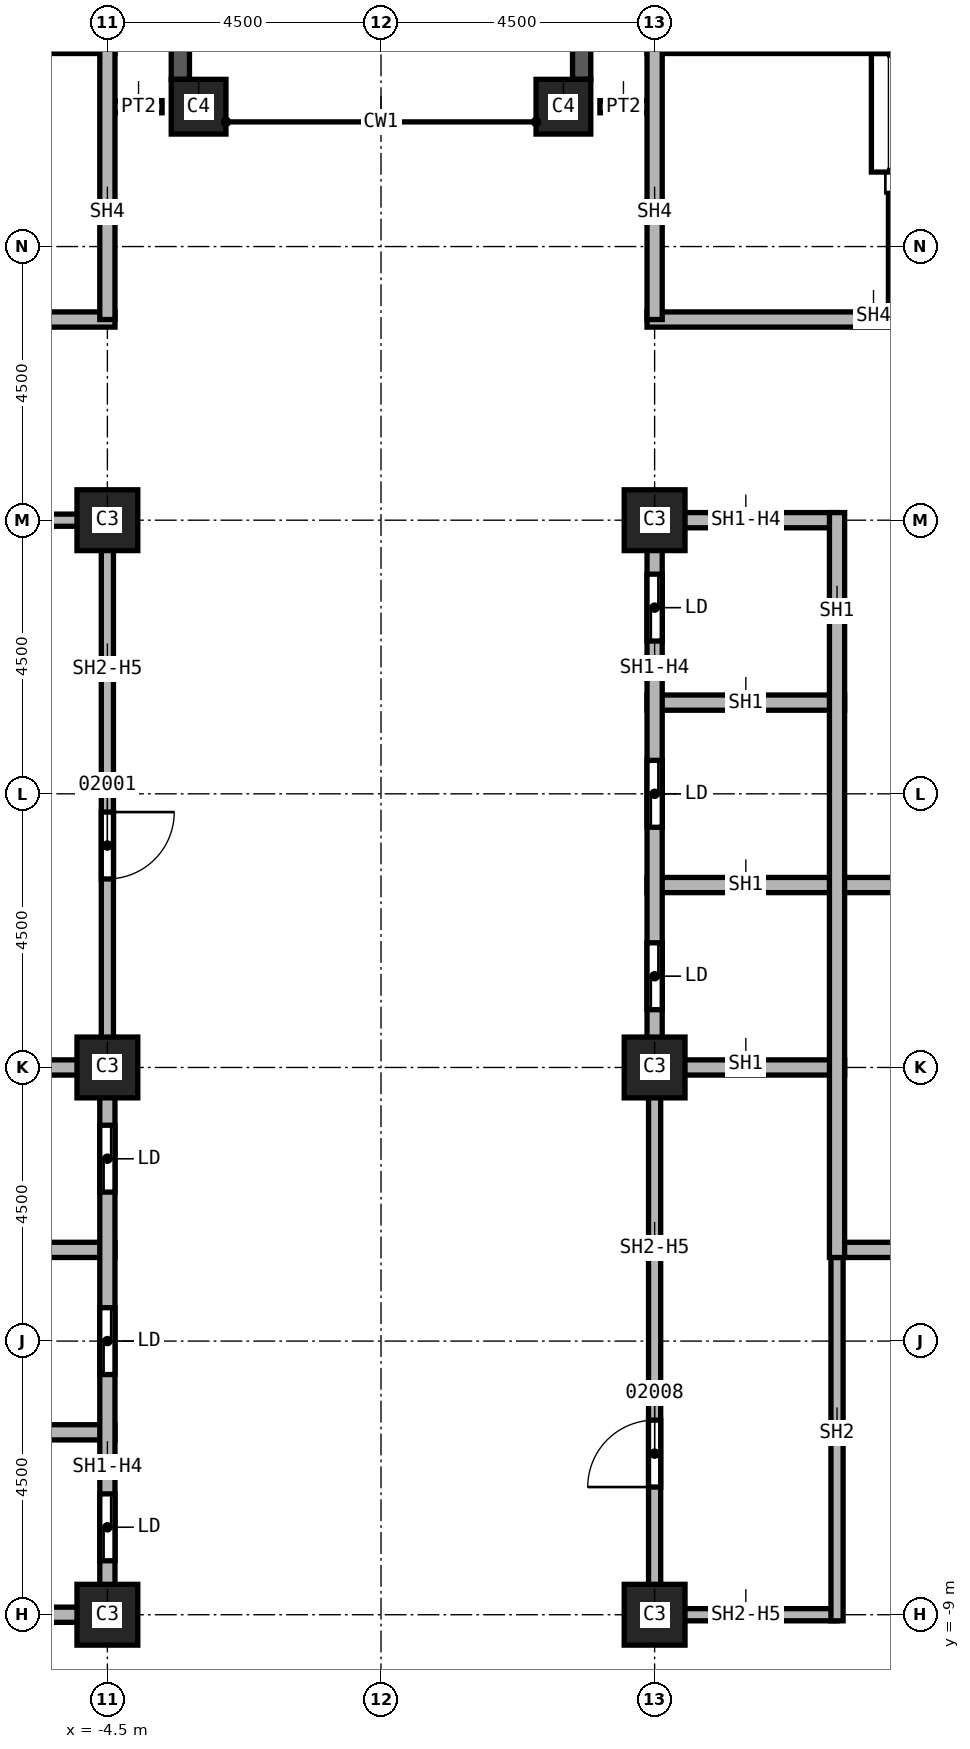
"""IFC4 building model, lengths in metres.
Left out: names, types, materials, properties, quantities, classifications, styles, units other than length and angle.
Written with IfcOpenShell. Run it as: python <this file> out.ifc"""

import sys

from ifc_helpers import new_model, si_unit, direction, frame, frame_2d, origin, origin_2d, place, context, subcontext, project, spatial, rectangle, extrude, element, fill, save


model = new_model("IFC4")
c1 = context("Model", 3, precision=1e-05, world=origin(), true_north=direction((0.0, 1.0)))
c2 = subcontext(c1, "Body", "Model", "MODEL_VIEW")
j1 = project(units=[si_unit("LENGTHUNIT", "METRE"), si_unit("PLANEANGLEUNIT", "RADIAN")], contexts=[c1])
p1 = place(None, origin())
s1 = spatial("IfcSite", under=j1, at=p1, CompositionType="ELEMENT")
p2 = place(p1, origin())
s2 = spatial("IfcBuilding", under=s1, at=p2, CompositionType="ELEMENT")
p3 = place(p2, frame((0.0, 0.0, 80.0)))
s3 = spatial("IfcBuildingStorey", under=s2, at=p3, CompositionType="ELEMENT", Elevation=80.0)
for number, where, z_axis, x_axis in (
    (1, (4.5, 0.0, 0.0), (0.0, 0.0, 1.0), (1.0, 0.0, 0.0)),
    (2, (4.5, 9.0, 0.0), (0.0, 0.0, 1.0), (1.0, 0.0, 0.0)),
    (3, (4.5, -9.0, 0.0), (0.0, 0.0, 1.0), (1.0, 0.0, 0.0)),
    (4, (-4.5, 0.0, 0.0), (0.0, 0.0, 1.0), (1.0, 0.0, 0.0)),
    (5, (-4.5, 9.0, 0.0), (0.0, 0.0, 1.0), (1.0, 0.0, 0.0)),
    (6, (-4.5, -9.0, 0.0), (0.0, 0.0, 1.0), (1.0, 0.0, 0.0)),
):
    element("IfcColumn", number, at=place(p3, frame(where, z_axis=z_axis, x_axis=x_axis)), inside=s3, PredefinedType="COLUMN", context=c2, shape_type="SweptSolid", body=[
        extrude(rectangle(XDim=1.0, YDim=1.0, at=origin_2d()), origin(), (0.0, 0.0, 1.0), 3.7),
    ])
for number, where, z_axis, x_axis in (
    (7, (3.0, 15.8, 0.0), (0.0, 0.0, 1.0), (1.0, 0.0, 0.0)),
    (8, (-3.0, 15.8, 0.0), (0.0, 0.0, 1.0), (1.0, 0.0, 0.0)),
):
    element("IfcColumn", number, at=place(p3, frame(where, z_axis=z_axis, x_axis=x_axis)), inside=s3, PredefinedType="COLUMN", context=c2, shape_type="SweptSolid", body=[
        extrude(rectangle(XDim=0.9, YDim=0.9, at=origin_2d()), origin(), (0.0, 0.0, 1.0), 3.7),
    ])
p4 = place(p3, frame((3.3, 24.2, 0.0), z_axis=(0.0, 0.0, 1.0), x_axis=(0.0, -1.0, 0.0)))
e9 = element("IfcWall", 9, at=p4, inside=s3, PredefinedType="SOLIDWALL", context=c2, shape_type="SweptSolid", body=[
    extrude(rectangle(XDim=7.95, YDim=0.3, at=frame_2d((3.975, 0.0))), origin(), (0.0, 0.0, 1.0), 3.1),
])
p5 = place(p4, frame((0.788, 0.0, 0.8)))
e10 = element("IfcOpeningElement", 10, at=p5, cuts=e9, PredefinedType="OPENING", context=c2, shape_type="SweptSolid", body=[
    extrude(rectangle(XDim=2.4, YDim=1.95, at=frame_2d((1.2, 0.975))), frame((0.0, 0.15, 0.0), z_axis=(0.0, -1.0, 0.0), x_axis=(1.0, 0.0, 0.0)), (0.0, 0.0, 1.0), 0.3),
])
p6 = place(p4, frame((4.762, 0.0, 0.8)))
e11 = element("IfcOpeningElement", 11, at=p6, cuts=e9, PredefinedType="OPENING", context=c2, shape_type="SweptSolid", body=[
    extrude(rectangle(XDim=2.4, YDim=1.95, at=frame_2d((1.2, 0.975))), frame((0.0, 0.15, 0.0), z_axis=(0.0, -1.0, 0.0), x_axis=(1.0, 0.0, 0.0)), (0.0, 0.0, 1.0), 0.3),
])
p7 = place(p3, frame((-3.3, 16.25, 0.0), z_axis=(0.0, 0.0, 1.0), x_axis=(0.0, 1.0, 0.0)))
e12 = element("IfcWall", 12, at=p7, inside=s3, PredefinedType="SOLIDWALL", context=c2, shape_type="SweptSolid", body=[
    extrude(rectangle(XDim=7.95, YDim=0.3, at=frame_2d((3.975, 0.0))), origin(), (0.0, 0.0, 1.0), 3.1),
])
p8 = place(p7, frame((0.788, 0.0, 0.8)))
e13 = element("IfcOpeningElement", 13, at=p8, cuts=e12, PredefinedType="OPENING", context=c2, shape_type="SweptSolid", body=[
    extrude(rectangle(XDim=2.4, YDim=1.95, at=frame_2d((1.2, 0.975))), frame((0.0, 0.15, 0.0), z_axis=(0.0, -1.0, 0.0), x_axis=(1.0, 0.0, 0.0)), (0.0, 0.0, 1.0), 0.3),
])
p9 = place(p7, frame((4.762, 0.0, 0.8)))
e14 = element("IfcOpeningElement", 14, at=p9, cuts=e12, PredefinedType="OPENING", context=c2, shape_type="SweptSolid", body=[
    extrude(rectangle(XDim=2.4, YDim=1.95, at=frame_2d((1.2, 0.975))), frame((0.0, 0.15, 0.0), z_axis=(0.0, -1.0, 0.0), x_axis=(1.0, 0.0, 0.0)), (0.0, 0.0, 1.0), 0.3),
])
for number, where, z_axis, x_axis in (
    (15, (-4.5, 15.8, 0.0), (0.0, 0.0, 1.0), (1.0, 0.0, 0.0)),
    (16, (3.6, 15.8, 0.0), (0.0, 0.0, 1.0), (1.0, 0.0, 0.0)),
):
    element("IfcWall", number, at=place(p3, frame(where, z_axis=z_axis, x_axis=x_axis)), inside=s3, PredefinedType="PARTITIONING", context=c2, shape_type="SweptSolid", body=[
        extrude(rectangle(XDim=0.9, YDim=0.2, at=frame_2d((0.45, 0.0))), origin(), (0.0, 0.0, 1.0), 3.7),
    ])
p10 = place(p3, frame((-7.5, 9.0, 0.0), z_axis=(0.0, 0.0, 1.0), x_axis=(1.0, 0.0, 0.0)))
e17 = element("IfcWall", 17, at=p10, inside=s3, PredefinedType="SOLIDWALL", context=c2, shape_type="SweptSolid", body=[
    extrude(rectangle(XDim=3.0, YDim=0.2, at=frame_2d((1.5, 0.0))), origin(), (0.0, 0.0, 1.0), 2.938),
])
p11 = place(p3, frame((-4.5, 9.1, 0.0), z_axis=(0.0, 0.0, 1.0), x_axis=(0.0, -1.0, 0.0)))
e18 = element("IfcWall", 18, at=p11, inside=s3, PredefinedType="SOLIDWALL", context=c2, shape_type="SweptSolid", body=[
    extrude(rectangle(XDim=9.1, YDim=0.2, at=frame_2d((4.55, 0.0))), origin(), (0.0, 0.0, 1.0), 2.938),
])
p12 = place(p11, frame((4.9, 0.0, 0.0)))
e19 = element("IfcOpeningElement", 19, at=p12, cuts=e18, PredefinedType="OPENING", context=c2, shape_type="SweptSolid", body=[
    extrude(rectangle(XDim=1.1, YDim=2.1, at=frame_2d((0.55, 1.05))), frame((0.0, 0.1, 0.0), z_axis=(0.0, -1.0, 0.0), x_axis=(1.0, 0.0, 0.0)), (0.0, 0.0, 1.0), 0.2),
])
p13 = place(p3, frame((4.5, -9.1, 0.0), z_axis=(0.0, 0.0, 1.0), x_axis=(0.0, 1.0, 0.0)))
e20 = element("IfcWall", 20, at=p13, inside=s3, PredefinedType="SOLIDWALL", context=c2, shape_type="SweptSolid", body=[
    extrude(rectangle(XDim=9.1, YDim=0.2, at=frame_2d((4.55, 0.0))), origin(), (0.0, 0.0, 1.0), 2.938),
])
p14 = place(p13, frame((2.2, 0.0, 0.0)))
e21 = element("IfcOpeningElement", 21, at=p14, cuts=e20, PredefinedType="OPENING", context=c2, shape_type="SweptSolid", body=[
    extrude(rectangle(XDim=1.1, YDim=2.1, at=frame_2d((0.55, 1.05))), frame((0.0, 0.1, 0.0), z_axis=(0.0, -1.0, 0.0), x_axis=(1.0, 0.0, 0.0)), (0.0, 0.0, 1.0), 0.2),
])
p15 = place(p3, frame((7.5, -9.0, 0.0), z_axis=(0.0, 0.0, 1.0), x_axis=(-1.0, 0.0, 0.0)))
e22 = element("IfcWall", 22, at=p15, inside=s3, PredefinedType="SOLIDWALL", context=c2, shape_type="SweptSolid", body=[
    extrude(rectangle(XDim=3.0, YDim=0.2, at=frame_2d((1.5, 0.0))), origin(), (0.0, 0.0, 1.0), 2.938),
])
p16 = place(p3, frame((7.5, -2.875, 0.0), z_axis=(0.0, 0.0, 1.0), x_axis=(0.0, -1.0, 0.0)))
e23 = element("IfcWall", 23, at=p16, inside=s3, PredefinedType="SOLIDWALL", context=c2, shape_type="SweptSolid", body=[
    extrude(rectangle(XDim=6.225, YDim=0.2, at=frame_2d((3.113, 0.0))), origin(), (0.0, 0.0, 1.0), 3.7),
])
p17 = place(p3, frame((-13.625, -3.0, 0.0), z_axis=(0.0, 0.0, 1.0), x_axis=(1.0, 0.0, 0.0)))
e24 = element("IfcWall", 24, at=p17, inside=s3, PredefinedType="SOLIDWALL", context=c2, shape_type="SweptSolid", body=[
    extrude(rectangle(XDim=9.25, YDim=0.25, at=frame_2d((4.625, 0.0))), origin(), (0.0, 0.0, 1.0), 3.7),
])
p18 = place(p17, frame((3.25, 0.0, 0.0)))
e25 = element("IfcOpeningElement", 25, at=p18, cuts=e24, PredefinedType="OPENING", context=c2, shape_type="SweptSolid", body=[
    extrude(rectangle(XDim=1.1, YDim=2.1, at=frame_2d((0.55, 1.05))), frame((0.0, 0.125, 0.0), z_axis=(0.0, -1.0, 0.0), x_axis=(1.0, 0.0, 0.0)), (0.0, 0.0, 1.0), 0.25),
])
for number, where, z_axis, x_axis in (
    (26, (-7.625, -6.0, 0.0), (0.0, 0.0, 1.0), (1.0, 0.0, 0.0)),
    (27, (-7.625, 0.0, 0.0), (0.0, 0.0, 1.0), (1.0, 0.0, 0.0)),
):
    element("IfcWall", number, at=place(p3, frame(where, z_axis=z_axis, x_axis=x_axis)), inside=s3, PredefinedType="SOLIDWALL", context=c2, shape_type="SweptSolid", body=[
        extrude(rectangle(XDim=3.25, YDim=0.25, at=frame_2d((1.625, 0.0))), origin(), (0.0, 0.0, 1.0), 3.7),
    ])
p19 = place(p3, frame((-4.5, -9.0, 0.0), z_axis=(0.0, 0.0, 1.0), x_axis=(-1.0, 0.0, 0.0)))
e28 = element("IfcWall", 28, at=p19, inside=s3, PredefinedType="SOLIDWALL", context=c2, shape_type="SweptSolid", body=[
    extrude(rectangle(XDim=3.0, YDim=0.25, at=frame_2d((1.5, 0.0))), origin(), (0.0, 0.0, 1.0), 2.938),
])
p20 = place(p3, frame((-4.5, 0.0, 0.0), z_axis=(0.0, 0.0, 1.0), x_axis=(0.0, -1.0, 0.0)))
e29 = element("IfcWall", 29, at=p20, inside=s3, PredefinedType="SOLIDWALL", context=c2, shape_type="SweptSolid", body=[
    extrude(rectangle(XDim=9.125, YDim=0.25, at=frame_2d((4.562, 0.0))), origin(), (0.0, 0.0, 1.0), 2.938),
])
p21 = place(p20, frame((7.012, 0.0, 0.0)))
e30 = element("IfcOpeningElement", 30, at=p21, cuts=e29, PredefinedType="OPENING", context=c2, shape_type="SweptSolid", body=[
    extrude(rectangle(XDim=1.1, YDim=2.1, at=frame_2d((0.55, 1.05))), frame((0.0, 0.125, 0.0), z_axis=(0.0, -1.0, 0.0), x_axis=(1.0, 0.0, 0.0)), (0.0, 0.0, 1.0), 0.25),
])
p22 = place(p20, frame((3.95, 0.0, 0.0)))
e31 = element("IfcOpeningElement", 31, at=p22, cuts=e29, PredefinedType="OPENING", context=c2, shape_type="SweptSolid", body=[
    extrude(rectangle(XDim=1.1, YDim=2.1, at=frame_2d((0.55, 1.05))), frame((0.0, 0.125, 0.0), z_axis=(0.0, -1.0, 0.0), x_axis=(1.0, 0.0, 0.0)), (0.0, 0.0, 1.0), 0.25),
])
p23 = place(p20, frame((0.95, 0.0, 0.0)))
e32 = element("IfcOpeningElement", 32, at=p23, cuts=e29, PredefinedType="OPENING", context=c2, shape_type="SweptSolid", body=[
    extrude(rectangle(XDim=1.1, YDim=2.1, at=frame_2d((0.55, 1.05))), frame((0.0, 0.125, 0.0), z_axis=(0.0, -1.0, 0.0), x_axis=(1.0, 0.0, 0.0)), (0.0, 0.0, 1.0), 0.25),
])
p24 = place(p3, frame((4.375, 0.0, 0.0), z_axis=(0.0, 0.0, 1.0), x_axis=(1.0, 0.0, 0.0)))
e33 = element("IfcWall", 33, at=p24, inside=s3, PredefinedType="SOLIDWALL", context=c2, shape_type="SweptSolid", body=[
    extrude(rectangle(XDim=3.25, YDim=0.25, at=frame_2d((1.625, 0.0))), origin(), (0.0, 0.0, 1.0), 3.7),
])
p25 = place(p3, frame((4.375, 3.0, 0.0), z_axis=(0.0, 0.0, 1.0), x_axis=(1.0, 0.0, 0.0)))
e34 = element("IfcWall", 34, at=p25, inside=s3, PredefinedType="SOLIDWALL", context=c2, shape_type="SweptSolid", body=[
    extrude(rectangle(XDim=9.25, YDim=0.25, at=frame_2d((4.625, 0.0))), origin(), (0.0, 0.0, 1.0), 3.7),
])
p26 = place(p25, frame((4.125, 0.0, 0.0)))
e35 = element("IfcOpeningElement", 35, at=p26, cuts=e34, PredefinedType="OPENING", context=c2, shape_type="SweptSolid", body=[
    extrude(rectangle(XDim=1.1, YDim=2.1, at=frame_2d((0.55, 1.05))), frame((0.0, 0.125, 0.0), z_axis=(0.0, -1.0, 0.0), x_axis=(1.0, 0.0, 0.0)), (0.0, 0.0, 1.0), 0.25),
])
p27 = place(p3, frame((4.375, 6.0, 0.0), z_axis=(0.0, 0.0, 1.0), x_axis=(1.0, 0.0, 0.0)))
e36 = element("IfcWall", 36, at=p27, inside=s3, PredefinedType="SOLIDWALL", context=c2, shape_type="SweptSolid", body=[
    extrude(rectangle(XDim=3.25, YDim=0.25, at=frame_2d((1.625, 0.0))), origin(), (0.0, 0.0, 1.0), 3.7),
])
p28 = place(p3, frame((4.5, 0.0, 0.0), z_axis=(0.0, 0.0, 1.0), x_axis=(0.0, 1.0, 0.0)))
e37 = element("IfcWall", 37, at=p28, inside=s3, PredefinedType="SOLIDWALL", context=c2, shape_type="SweptSolid", body=[
    extrude(rectangle(XDim=9.125, YDim=0.25, at=frame_2d((4.562, 0.0))), origin(), (0.0, 0.0, 1.0), 2.938),
])
p29 = place(p28, frame((0.95, 0.0, 0.0)))
e38 = element("IfcOpeningElement", 38, at=p29, cuts=e37, PredefinedType="OPENING", context=c2, shape_type="SweptSolid", body=[
    extrude(rectangle(XDim=1.1, YDim=2.1, at=frame_2d((0.55, 1.05))), frame((0.0, 0.125, 0.0), z_axis=(0.0, -1.0, 0.0), x_axis=(1.0, 0.0, 0.0)), (0.0, 0.0, 1.0), 0.25),
])
p30 = place(p28, frame((3.95, 0.0, 0.0)))
e39 = element("IfcOpeningElement", 39, at=p30, cuts=e37, PredefinedType="OPENING", context=c2, shape_type="SweptSolid", body=[
    extrude(rectangle(XDim=1.1, YDim=2.1, at=frame_2d((0.55, 1.05))), frame((0.0, 0.125, 0.0), z_axis=(0.0, -1.0, 0.0), x_axis=(1.0, 0.0, 0.0)), (0.0, 0.0, 1.0), 0.25),
])
p31 = place(p28, frame((7.012, 0.0, 0.0)))
e40 = element("IfcOpeningElement", 40, at=p31, cuts=e37, PredefinedType="OPENING", context=c2, shape_type="SweptSolid", body=[
    extrude(rectangle(XDim=1.1, YDim=2.1, at=frame_2d((0.55, 1.05))), frame((0.0, 0.125, 0.0), z_axis=(0.0, -1.0, 0.0), x_axis=(1.0, 0.0, 0.0)), (0.0, 0.0, 1.0), 0.25),
])
p32 = place(p3, frame((4.5, 9.0, 0.0), z_axis=(0.0, 0.0, 1.0), x_axis=(1.0, 0.0, 0.0)))
e41 = element("IfcWall", 41, at=p32, inside=s3, PredefinedType="SOLIDWALL", context=c2, shape_type="SweptSolid", body=[
    extrude(rectangle(XDim=3.0, YDim=0.25, at=frame_2d((1.5, 0.0))), origin(), (0.0, 0.0, 1.0), 2.938),
])
p33 = place(p3, frame((7.5, -3.0, 0.0), z_axis=(0.0, 0.0, 1.0), x_axis=(1.0, 0.0, 0.0)))
e42 = element("IfcWall", 42, at=p33, inside=s3, PredefinedType="SOLIDWALL", context=c2, shape_type="SweptSolid", body=[
    extrude(rectangle(XDim=6.125, YDim=0.25, at=frame_2d((3.062, 0.0))), origin(), (0.0, 0.0, 1.0), 3.7),
])
p34 = place(p33, frame((1.0, 0.0, 0.0)))
e43 = element("IfcOpeningElement", 43, at=p34, cuts=e42, PredefinedType="OPENING", context=c2, shape_type="SweptSolid", body=[
    extrude(rectangle(XDim=1.1, YDim=2.1, at=frame_2d((0.55, 1.05))), frame((0.0, 0.125, 0.0), z_axis=(0.0, -1.0, 0.0), x_axis=(1.0, 0.0, 0.0)), (0.0, 0.0, 1.0), 0.25),
])
p35 = place(p3, frame((7.5, 9.125, 0.0), z_axis=(0.0, 0.0, 1.0), x_axis=(0.0, -1.0, 0.0)))
e44 = element("IfcWall", 44, at=p35, inside=s3, PredefinedType="SOLIDWALL", context=c2, shape_type="SweptSolid", body=[
    extrude(rectangle(XDim=12.25, YDim=0.25, at=frame_2d((6.125, 0.0))), origin(), (0.0, 0.0, 1.0), 3.7),
])
p36 = place(p3, frame((-13.5, 12.3, 0.0), z_axis=(0.0, 0.0, 1.0), x_axis=(1.0, 0.0, 0.0)))
e45 = element("IfcWall", 45, at=p36, inside=s3, PredefinedType="SOLIDWALL", context=c2, shape_type="SweptSolid", body=[
    extrude(rectangle(XDim=9.125, YDim=0.25, at=frame_2d((4.562, 0.0))), origin(), (0.0, 0.0, 1.0), 3.7),
])
p37 = place(p36, frame((0.6, 0.0, 0.0)))
e46 = element("IfcOpeningElement", 46, at=p37, cuts=e45, PredefinedType="OPENING", context=c2, shape_type="SweptSolid", body=[
    extrude(rectangle(XDim=1.2, YDim=2.1, at=frame_2d((0.6, 1.05))), frame((0.0, 0.125, 0.0), z_axis=(0.0, -1.0, 0.0), x_axis=(1.0, 0.0, 0.0)), (0.0, 0.0, 1.0), 0.25),
])
p38 = place(p3, frame((-13.5, 16.8, 0.0), z_axis=(0.0, 0.0, 1.0), x_axis=(1.0, 0.0, 0.0)))
e47 = element("IfcWall", 47, at=p38, inside=s3, PredefinedType="SOLIDWALL", context=c2, shape_type="SweptSolid", body=[
    extrude(rectangle(XDim=9.125, YDim=0.25, at=frame_2d((4.562, 0.0))), origin(), (0.0, 0.0, 1.0), 3.7),
])
p39 = place(p3, frame((-4.5, 16.8, 0.0), z_axis=(0.0, 0.0, 1.0), x_axis=(0.0, -1.0, 0.0)))
e48 = element("IfcWall", 48, at=p39, inside=s3, PredefinedType="SOLIDWALL", context=c2, shape_type="SweptSolid", body=[
    extrude(rectangle(XDim=4.5, YDim=0.25, at=frame_2d((2.25, 0.0))), origin(), (0.0, 0.0, 1.0), 3.7),
])
p40 = place(p3, frame((4.375, 12.3, 0.0), z_axis=(0.0, 0.0, 1.0), x_axis=(1.0, 0.0, 0.0)))
e49 = element("IfcWall", 49, at=p40, inside=s3, PredefinedType="SOLIDWALL", context=c2, shape_type="SweptSolid", body=[
    extrude(rectangle(XDim=9.125, YDim=0.25, at=frame_2d((4.562, 0.0))), origin(), (0.0, 0.0, 1.0), 3.7),
])
p41 = place(p40, frame((7.2, 0.0, 0.0)))
e50 = element("IfcOpeningElement", 50, at=p41, cuts=e49, PredefinedType="OPENING", context=c2, shape_type="SweptSolid", body=[
    extrude(rectangle(XDim=1.2, YDim=2.1, at=frame_2d((0.6, 1.05))), frame((0.0, 0.125, 0.0), z_axis=(0.0, -1.0, 0.0), x_axis=(1.0, 0.0, 0.0)), (0.0, 0.0, 1.0), 0.25),
])
p42 = place(p3, frame((4.375, 16.8, 0.0), z_axis=(0.0, 0.0, 1.0), x_axis=(1.0, 0.0, 0.0)))
e51 = element("IfcWall", 51, at=p42, inside=s3, PredefinedType="SOLIDWALL", context=c2, shape_type="SweptSolid", body=[
    extrude(rectangle(XDim=9.125, YDim=0.25, at=frame_2d((4.562, 0.0))), origin(), (0.0, 0.0, 1.0), 3.7),
])
p43 = place(p3, frame((4.5, 12.3, 0.0), z_axis=(0.0, 0.0, 1.0), x_axis=(0.0, 1.0, 0.0)))
e52 = element("IfcWall", 52, at=p43, inside=s3, PredefinedType="SOLIDWALL", context=c2, shape_type="SweptSolid", body=[
    extrude(rectangle(XDim=4.5, YDim=0.25, at=frame_2d((2.25, 0.0))), origin(), (0.0, 0.0, 1.0), 3.7),
])
p44 = place(p12, origin())
e53 = element("IfcDoor", 53, at=p44, inside=s3, OperationType="SINGLE_SWING_RIGHT", PredefinedType="DOOR", context=c2, shape_type="SweptSolid", body=[
    extrude(rectangle(XDim=1.1, YDim=2.1, at=frame_2d((0.55, 1.05))), frame((0.0, 0.025, 0.0), z_axis=(0.0, -1.0, 0.0), x_axis=(1.0, 0.0, 0.0)), (0.0, 0.0, 1.0), 0.05),
])
fill(e19, e53)
p45 = place(p14, origin())
e54 = element("IfcDoor", 54, at=p45, inside=s3, OperationType="SINGLE_SWING_LEFT", PredefinedType="DOOR", context=c2, shape_type="SweptSolid", body=[
    extrude(rectangle(XDim=1.1, YDim=2.1, at=frame_2d((0.55, 1.05))), frame((0.0, 0.025, 0.0), z_axis=(0.0, -1.0, 0.0), x_axis=(1.0, 0.0, 0.0)), (0.0, 0.0, 1.0), 0.05),
])
fill(e21, e54)
p46 = place(p21, origin())
e55 = element("IfcDoor", 55, at=p46, inside=s3, OperationType="SLIDING_TO_LEFT", PredefinedType="DOOR", context=c2, shape_type="SweptSolid", body=[
    extrude(rectangle(XDim=1.1, YDim=2.1, at=frame_2d((0.55, 1.05))), frame((0.0, 0.025, 0.0), z_axis=(0.0, -1.0, 0.0), x_axis=(1.0, 0.0, 0.0)), (0.0, 0.0, 1.0), 0.05),
])
fill(e30, e55)
p47 = place(p22, origin())
e56 = element("IfcDoor", 56, at=p47, inside=s3, OperationType="SLIDING_TO_LEFT", PredefinedType="DOOR", context=c2, shape_type="SweptSolid", body=[
    extrude(rectangle(XDim=1.1, YDim=2.1, at=frame_2d((0.55, 1.05))), frame((0.0, 0.025, 0.0), z_axis=(0.0, -1.0, 0.0), x_axis=(1.0, 0.0, 0.0)), (0.0, 0.0, 1.0), 0.05),
])
fill(e31, e56)
p48 = place(p23, origin())
e57 = element("IfcDoor", 57, at=p48, inside=s3, OperationType="SLIDING_TO_LEFT", PredefinedType="DOOR", context=c2, shape_type="SweptSolid", body=[
    extrude(rectangle(XDim=1.1, YDim=2.1, at=frame_2d((0.55, 1.05))), frame((0.0, 0.025, 0.0), z_axis=(0.0, -1.0, 0.0), x_axis=(1.0, 0.0, 0.0)), (0.0, 0.0, 1.0), 0.05),
])
fill(e32, e57)
p49 = place(p29, origin())
e58 = element("IfcDoor", 58, at=p49, inside=s3, OperationType="SLIDING_TO_LEFT", PredefinedType="DOOR", context=c2, shape_type="SweptSolid", body=[
    extrude(rectangle(XDim=1.1, YDim=2.1, at=frame_2d((0.55, 1.05))), frame((0.0, 0.025, 0.0), z_axis=(0.0, -1.0, 0.0), x_axis=(1.0, 0.0, 0.0)), (0.0, 0.0, 1.0), 0.05),
])
fill(e38, e58)
p50 = place(p30, origin())
e59 = element("IfcDoor", 59, at=p50, inside=s3, OperationType="SLIDING_TO_LEFT", PredefinedType="DOOR", context=c2, shape_type="SweptSolid", body=[
    extrude(rectangle(XDim=1.1, YDim=2.1, at=frame_2d((0.55, 1.05))), frame((0.0, 0.025, 0.0), z_axis=(0.0, -1.0, 0.0), x_axis=(1.0, 0.0, 0.0)), (0.0, 0.0, 1.0), 0.05),
])
fill(e39, e59)
p51 = place(p31, origin())
e60 = element("IfcDoor", 60, at=p51, inside=s3, OperationType="SLIDING_TO_LEFT", PredefinedType="DOOR", context=c2, shape_type="SweptSolid", body=[
    extrude(rectangle(XDim=1.1, YDim=2.1, at=frame_2d((0.55, 1.05))), frame((0.0, 0.025, 0.0), z_axis=(0.0, -1.0, 0.0), x_axis=(1.0, 0.0, 0.0)), (0.0, 0.0, 1.0), 0.05),
])
fill(e40, e60)
save(model, sys.argv[1])
